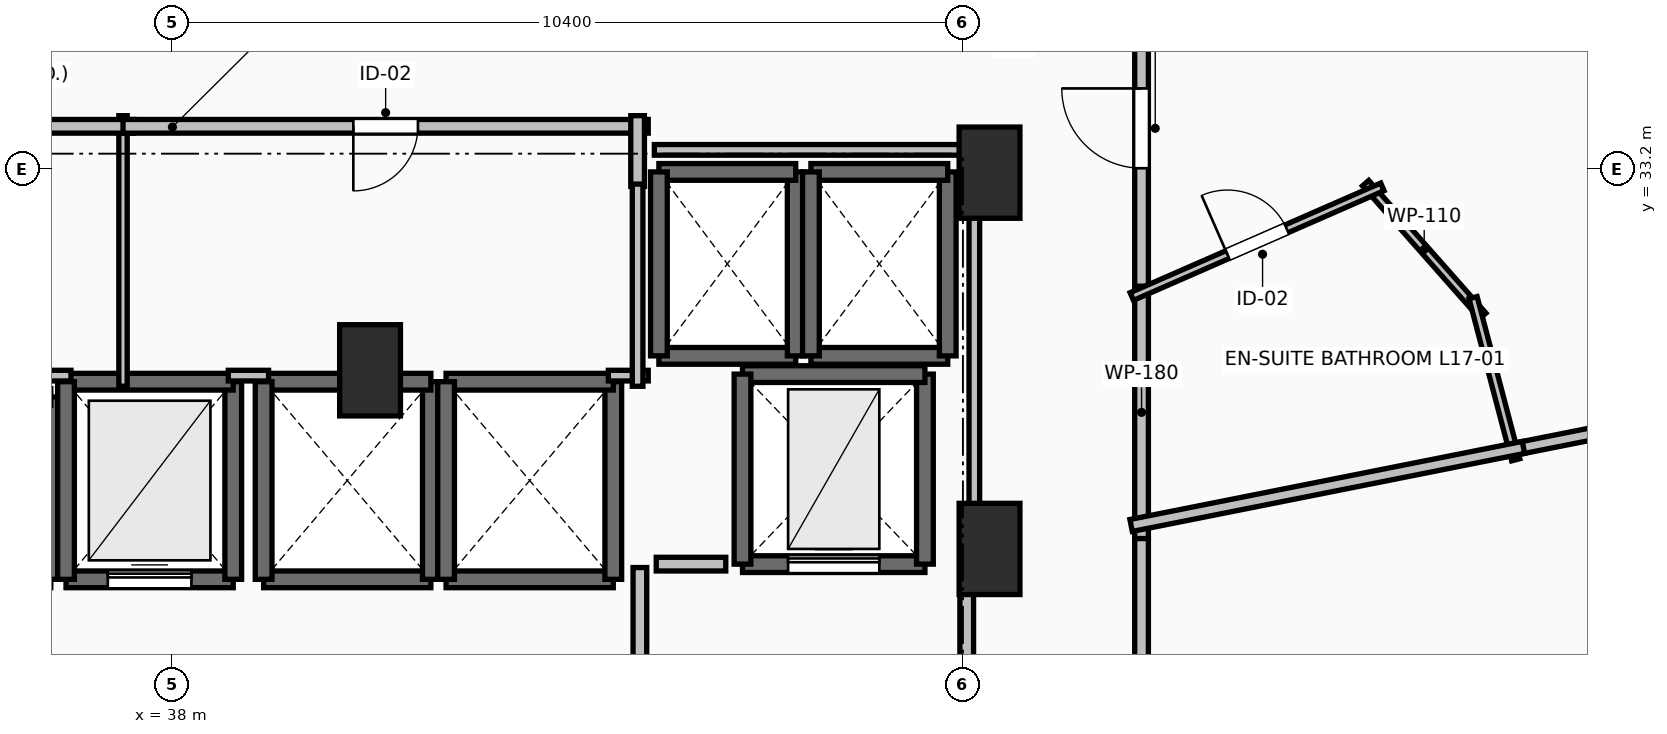
"""IFC4 building model, lengths in metres.
Left out: names, types, materials, properties, quantities, classifications, styles, units other than length and angle.
Written with IfcOpenShell. Run it as: python <this file> out.ifc"""

import sys

from ifc_helpers import new_model, si_unit, direction, frame, frame_2d, origin, origin_2d, place, context, subcontext, project, spatial, rectangle, extrude, element, fill, save


model = new_model("IFC4")
c1 = context("Model", 3, precision=1e-05, world=origin(), true_north=direction((0.0, 1.0)))
c2 = subcontext(c1, "Body", "Model", "MODEL_VIEW")
j1 = project(units=[si_unit("LENGTHUNIT", "METRE"), si_unit("PLANEANGLEUNIT", "RADIAN")], contexts=[c1])
p1 = place(None, origin())
s1 = spatial("IfcSite", under=j1, at=p1, CompositionType="ELEMENT")
p2 = place(p1, origin())
s2 = spatial("IfcBuilding", under=s1, at=p2, CompositionType="ELEMENT")
p3 = place(p2, frame((0.0, 0.0, 66.0)))
s3 = spatial("IfcBuildingStorey", under=s2, at=p3, CompositionType="ELEMENT", Elevation=66.0)
for number, where, z_axis, x_axis in (
    (1, (48.75, 33.15, 0.0), (0.0, 0.0, 1.0), (1.0, 0.0, 0.0)),
    (2, (48.75, 28.2, 0.0), (0.0, 0.0, 1.0), (1.0, 0.0, 0.0)),
    (3, (40.6, 30.55, 0.0), (0.0, 0.0, 1.0), (1.0, 0.0, 0.0)),
):
    element("IfcColumn", number, at=place(p3, frame(where, z_axis=z_axis, x_axis=x_axis)), inside=s3, PredefinedType="PILASTER", context=c2, shape_type="SweptSolid", body=[
        extrude(rectangle(XDim=0.8, YDim=1.2, at=origin_2d()), origin(), (0.0, 0.0, 1.0), 3.5),
    ])
p4 = place(p3, frame((36.4, 27.8, 0.0), z_axis=(0.0, 0.0, 1.0), x_axis=(0.0, 1.0, 0.0)))
e4 = element("IfcWall", 4, at=p4, inside=s3, PredefinedType="SOLIDWALL", context=c2, shape_type="SweptSolid", body=[
    extrude(rectangle(XDim=2.4, YDim=0.22, at=frame_2d((1.2, 0.0))), origin(), (0.0, 0.0, 1.0), 3.15),
])
p5 = place(p3, frame((36.6, 27.8, 0.0), z_axis=(0.0, 0.0, 1.0), x_axis=(1.0, 0.0, 0.0)))
e5 = element("IfcWall", 5, at=p5, inside=s3, PredefinedType="SOLIDWALL", context=c2, shape_type="SweptSolid", body=[
    extrude(rectangle(XDim=2.2, YDim=0.22, at=frame_2d((1.1, 0.0))), origin(), (0.0, 0.0, 1.0), 3.15),
])
p6 = place(p5, frame((0.55, 0.0, 0.0)))
e6 = element("IfcOpeningElement", 6, at=p6, cuts=e5, PredefinedType="OPENING", context=c2, shape_type="SweptSolid", body=[
    extrude(rectangle(XDim=1.1, YDim=2.2, at=frame_2d((0.55, 1.1))), frame((0.0, 0.125, 0.0), z_axis=(0.0, -1.0, 0.0), x_axis=(1.0, 0.0, 0.0)), (0.0, 0.0, 1.0), 0.25),
])
p7 = place(p3, frame((38.8, 27.8, 0.0), z_axis=(0.0, 0.0, 1.0), x_axis=(0.0, 1.0, 0.0)))
e7 = element("IfcWall", 7, at=p7, inside=s3, PredefinedType="SOLIDWALL", context=c2, shape_type="SweptSolid", body=[
    extrude(rectangle(XDim=2.6, YDim=0.22, at=frame_2d((1.3, 0.0))), origin(), (0.0, 0.0, 1.0), 3.15),
])
p8 = place(p3, frame((38.8, 30.4, 0.0), z_axis=(0.0, 0.0, 1.0), x_axis=(-1.0, 0.0, 0.0)))
e8 = element("IfcWall", 8, at=p8, inside=s3, PredefinedType="SOLIDWALL", context=c2, shape_type="SweptSolid", body=[
    extrude(rectangle(XDim=2.2, YDim=0.22, at=frame_2d((1.1, 0.0))), origin(), (0.0, 0.0, 1.0), 3.15),
])
p9 = place(p3, frame((36.6, 30.4, 0.0), z_axis=(0.0, 0.0, 1.0), x_axis=(0.0, -1.0, 0.0)))
e9 = element("IfcWall", 9, at=p9, inside=s3, PredefinedType="SOLIDWALL", context=c2, shape_type="SweptSolid", body=[
    extrude(rectangle(XDim=2.6, YDim=0.22, at=frame_2d((1.3, 0.0))), origin(), (0.0, 0.0, 1.0), 3.15),
])
p10 = place(p3, frame((39.2, 27.8, 0.0), z_axis=(0.0, 0.0, 1.0), x_axis=(1.0, 0.0, 0.0)))
e10 = element("IfcWall", 10, at=p10, inside=s3, PredefinedType="SOLIDWALL", context=c2, shape_type="SweptSolid", body=[
    extrude(rectangle(XDim=2.2, YDim=0.22, at=frame_2d((1.1, 0.0))), origin(), (0.0, 0.0, 1.0), 3.15),
])
p11 = place(p3, frame((41.4, 27.8, 0.0), z_axis=(0.0, 0.0, 1.0), x_axis=(0.0, 1.0, 0.0)))
e11 = element("IfcWall", 11, at=p11, inside=s3, PredefinedType="SOLIDWALL", context=c2, shape_type="SweptSolid", body=[
    extrude(rectangle(XDim=2.6, YDim=0.22, at=frame_2d((1.3, 0.0))), origin(), (0.0, 0.0, 1.0), 3.15),
])
p12 = place(p3, frame((41.4, 30.4, 0.0), z_axis=(0.0, 0.0, 1.0), x_axis=(-1.0, 0.0, 0.0)))
e12 = element("IfcWall", 12, at=p12, inside=s3, PredefinedType="SOLIDWALL", context=c2, shape_type="SweptSolid", body=[
    extrude(rectangle(XDim=2.2, YDim=0.22, at=frame_2d((1.1, 0.0))), origin(), (0.0, 0.0, 1.0), 3.15),
])
p13 = place(p3, frame((39.2, 30.4, 0.0), z_axis=(0.0, 0.0, 1.0), x_axis=(0.0, -1.0, 0.0)))
e13 = element("IfcWall", 13, at=p13, inside=s3, PredefinedType="SOLIDWALL", context=c2, shape_type="SweptSolid", body=[
    extrude(rectangle(XDim=2.6, YDim=0.22, at=frame_2d((1.3, 0.0))), origin(), (0.0, 0.0, 1.0), 3.15),
])
p14 = place(p3, frame((41.6, 27.8, 0.0), z_axis=(0.0, 0.0, 1.0), x_axis=(1.0, 0.0, 0.0)))
e14 = element("IfcWall", 14, at=p14, inside=s3, PredefinedType="SOLIDWALL", context=c2, shape_type="SweptSolid", body=[
    extrude(rectangle(XDim=2.2, YDim=0.22, at=frame_2d((1.1, 0.0))), origin(), (0.0, 0.0, 1.0), 3.15),
])
p15 = place(p3, frame((43.8, 27.8, 0.0), z_axis=(0.0, 0.0, 1.0), x_axis=(0.0, 1.0, 0.0)))
e15 = element("IfcWall", 15, at=p15, inside=s3, PredefinedType="SOLIDWALL", context=c2, shape_type="SweptSolid", body=[
    extrude(rectangle(XDim=2.6, YDim=0.22, at=frame_2d((1.3, 0.0))), origin(), (0.0, 0.0, 1.0), 3.15),
])
p16 = place(p3, frame((43.8, 30.4, 0.0), z_axis=(0.0, 0.0, 1.0), x_axis=(-1.0, 0.0, 0.0)))
e16 = element("IfcWall", 16, at=p16, inside=s3, PredefinedType="SOLIDWALL", context=c2, shape_type="SweptSolid", body=[
    extrude(rectangle(XDim=2.2, YDim=0.22, at=frame_2d((1.1, 0.0))), origin(), (0.0, 0.0, 1.0), 3.15),
])
p17 = place(p3, frame((41.6, 30.4, 0.0), z_axis=(0.0, 0.0, 1.0), x_axis=(0.0, -1.0, 0.0)))
e17 = element("IfcWall", 17, at=p17, inside=s3, PredefinedType="SOLIDWALL", context=c2, shape_type="SweptSolid", body=[
    extrude(rectangle(XDim=2.6, YDim=0.22, at=frame_2d((1.3, 0.0))), origin(), (0.0, 0.0, 1.0), 3.15),
])
p18 = place(p3, frame((44.4, 30.74, 0.0), z_axis=(0.0, 0.0, 1.0), x_axis=(1.0, 0.0, 0.0)))
e18 = element("IfcWall", 18, at=p18, inside=s3, PredefinedType="SOLIDWALL", context=c2, shape_type="SweptSolid", body=[
    extrude(rectangle(XDim=1.8, YDim=0.22, at=frame_2d((0.9, 0.0))), origin(), (0.0, 0.0, 1.0), 3.15),
])
p19 = place(p3, frame((46.2, 30.74, 0.0), z_axis=(0.0, 0.0, 1.0), x_axis=(0.0, 1.0, 0.0)))
e19 = element("IfcWall", 19, at=p19, inside=s3, PredefinedType="SOLIDWALL", context=c2, shape_type="SweptSolid", body=[
    extrude(rectangle(XDim=2.42, YDim=0.22, at=frame_2d((1.21, 0.0))), origin(), (0.0, 0.0, 1.0), 3.15),
])
p20 = place(p3, frame((46.2, 33.16, 0.0), z_axis=(0.0, 0.0, 1.0), x_axis=(-1.0, 0.0, 0.0)))
e20 = element("IfcWall", 20, at=p20, inside=s3, PredefinedType="SOLIDWALL", context=c2, shape_type="SweptSolid", body=[
    extrude(rectangle(XDim=1.8, YDim=0.22, at=frame_2d((0.9, 0.0))), origin(), (0.0, 0.0, 1.0), 3.15),
])
p21 = place(p3, frame((44.4, 33.16, 0.0), z_axis=(0.0, 0.0, 1.0), x_axis=(0.0, -1.0, 0.0)))
e21 = element("IfcWall", 21, at=p21, inside=s3, PredefinedType="SOLIDWALL", context=c2, shape_type="SweptSolid", body=[
    extrude(rectangle(XDim=2.42, YDim=0.22, at=frame_2d((1.21, 0.0))), origin(), (0.0, 0.0, 1.0), 3.15),
])
p22 = place(p3, frame((46.4, 30.74, 0.0), z_axis=(0.0, 0.0, 1.0), x_axis=(1.0, 0.0, 0.0)))
e22 = element("IfcWall", 22, at=p22, inside=s3, PredefinedType="SOLIDWALL", context=c2, shape_type="SweptSolid", body=[
    extrude(rectangle(XDim=1.8, YDim=0.22, at=frame_2d((0.9, 0.0))), origin(), (0.0, 0.0, 1.0), 3.15),
])
p23 = place(p3, frame((48.2, 30.74, 0.0), z_axis=(0.0, 0.0, 1.0), x_axis=(0.0, 1.0, 0.0)))
e23 = element("IfcWall", 23, at=p23, inside=s3, PredefinedType="SOLIDWALL", context=c2, shape_type="SweptSolid", body=[
    extrude(rectangle(XDim=2.42, YDim=0.22, at=frame_2d((1.21, 0.0))), origin(), (0.0, 0.0, 1.0), 3.15),
])
p24 = place(p3, frame((48.2, 33.16, 0.0), z_axis=(0.0, 0.0, 1.0), x_axis=(-1.0, 0.0, 0.0)))
e24 = element("IfcWall", 24, at=p24, inside=s3, PredefinedType="SOLIDWALL", context=c2, shape_type="SweptSolid", body=[
    extrude(rectangle(XDim=1.8, YDim=0.22, at=frame_2d((0.9, 0.0))), origin(), (0.0, 0.0, 1.0), 3.15),
])
p25 = place(p3, frame((46.4, 33.16, 0.0), z_axis=(0.0, 0.0, 1.0), x_axis=(0.0, -1.0, 0.0)))
e25 = element("IfcWall", 25, at=p25, inside=s3, PredefinedType="SOLIDWALL", context=c2, shape_type="SweptSolid", body=[
    extrude(rectangle(XDim=2.42, YDim=0.22, at=frame_2d((1.21, 0.0))), origin(), (0.0, 0.0, 1.0), 3.15),
])
p26 = place(p3, frame((45.5, 28.0, 0.0), z_axis=(0.0, 0.0, 1.0), x_axis=(1.0, 0.0, 0.0)))
e26 = element("IfcWall", 26, at=p26, inside=s3, PredefinedType="SHEAR", context=c2, shape_type="SweptSolid", body=[
    extrude(rectangle(XDim=2.4, YDim=0.22, at=frame_2d((1.2, 0.0))), origin(), (0.0, 0.0, 1.0), 3.15),
])
p27 = place(p26, frame((0.6, 0.0, 0.0)))
e27 = element("IfcOpeningElement", 27, at=p27, cuts=e26, PredefinedType="OPENING", context=c2, shape_type="SweptSolid", body=[
    extrude(rectangle(XDim=1.2, YDim=2.2, at=frame_2d((0.6, 1.1))), frame((0.0, 0.125, 0.0), z_axis=(0.0, -1.0, 0.0), x_axis=(1.0, 0.0, 0.0)), (0.0, 0.0, 1.0), 0.25),
])
p28 = place(p3, frame((47.9, 28.0, 0.0), z_axis=(0.0, 0.0, 1.0), x_axis=(0.0, 1.0, 0.0)))
e28 = element("IfcWall", 28, at=p28, inside=s3, PredefinedType="SHEAR", context=c2, shape_type="SweptSolid", body=[
    extrude(rectangle(XDim=2.5, YDim=0.22, at=frame_2d((1.25, 0.0))), origin(), (0.0, 0.0, 1.0), 3.15),
])
p29 = place(p3, frame((47.9, 30.5, 0.0), z_axis=(0.0, 0.0, 1.0), x_axis=(-1.0, 0.0, 0.0)))
e29 = element("IfcWall", 29, at=p29, inside=s3, PredefinedType="SHEAR", context=c2, shape_type="SweptSolid", body=[
    extrude(rectangle(XDim=2.4, YDim=0.22, at=frame_2d((1.2, 0.0))), origin(), (0.0, 0.0, 1.0), 3.15),
])
p30 = place(p3, frame((45.5, 30.5, 0.0), z_axis=(0.0, 0.0, 1.0), x_axis=(0.0, -1.0, 0.0)))
e30 = element("IfcWall", 30, at=p30, inside=s3, PredefinedType="SHEAR", context=c2, shape_type="SweptSolid", body=[
    extrude(rectangle(XDim=2.5, YDim=0.22, at=frame_2d((1.25, 0.0))), origin(), (0.0, 0.0, 1.0), 3.15),
])
p31 = place(p3, frame((44.15, 27.955, 0.0), z_axis=(0.0, 0.0, 1.0), x_axis=(0.0, -1.0, 0.0)))
e31 = element("IfcWall", 31, at=p31, inside=s3, PredefinedType="PARTITIONING", context=c2, shape_type="SweptSolid", body=[
    extrude(rectangle(XDim=3.91, YDim=0.18, at=frame_2d((1.955, 0.0))), origin(), (0.0, 0.0, 1.0), 3.15),
])
p32 = place(p31, frame((1.355, 0.0, 0.0)))
e32 = element("IfcOpeningElement", 32, at=p32, cuts=e31, PredefinedType="OPENING", context=c2, shape_type="SweptSolid", body=[
    extrude(rectangle(XDim=1.2, YDim=2.15, at=frame_2d((0.6, 1.075))), frame((0.0, 0.105, 0.0), z_axis=(0.0, -1.0, 0.0), x_axis=(1.0, 0.0, 0.0)), (0.0, 0.0, 1.0), 0.21),
])
p33 = place(p3, frame((48.45, 23.95, 0.0), z_axis=(0.0, 0.0, 1.0), x_axis=(0.0, 1.0, 0.0)))
e33 = element("IfcWall", 33, at=p33, inside=s3, PredefinedType="PARTITIONING", context=c2, shape_type="SweptSolid", body=[
    extrude(rectangle(XDim=4.05, YDim=0.18, at=frame_2d((2.025, 0.0))), origin(), (0.0, 0.0, 1.0), 3.15),
])
p34 = place(p33, frame((1.425, 0.0, 0.0)))
e34 = element("IfcOpeningElement", 34, at=p34, cuts=e33, PredefinedType="OPENING", context=c2, shape_type="SweptSolid", body=[
    extrude(rectangle(XDim=1.2, YDim=2.15, at=frame_2d((0.6, 1.075))), frame((0.0, 0.105, 0.0), z_axis=(0.0, -1.0, 0.0), x_axis=(1.0, 0.0, 0.0)), (0.0, 0.0, 1.0), 0.21),
])
p35 = place(p3, frame((37.35, 30.34, 0.0), z_axis=(0.0, 0.0, 1.0), x_axis=(0.0, 1.0, 0.0)))
e35 = element("IfcWall", 35, at=p35, inside=s3, PredefinedType="PARTITIONING", context=c2, shape_type="SweptSolid", body=[
    extrude(rectangle(XDim=3.56, YDim=0.11, at=frame_2d((1.78, 0.0))), origin(), (0.0, 0.0, 1.0), 2.342),
])
p36 = place(p3, frame((37.49, 33.76, 0.0), z_axis=(0.0, 0.0, 1.0), x_axis=(-1.0, 0.0, 0.0)))
e36 = element("IfcWall", 36, at=p36, inside=s3, PredefinedType="PARTITIONING", context=c2, shape_type="SweptSolid", body=[
    extrude(rectangle(XDim=4.13, YDim=0.18, at=frame_2d((2.065, 0.0))), origin(), (0.0, 0.0, 1.0), 3.15),
])
p37 = place(p36, frame((1.64, 0.0, 0.0)))
e37 = element("IfcOpeningElement", 37, at=p37, cuts=e36, PredefinedType="OPENING", context=c2, shape_type="SweptSolid", body=[
    extrude(rectangle(XDim=0.85, YDim=2.1, at=frame_2d((0.425, 1.05))), frame((0.0, 0.105, 0.0), z_axis=(0.0, -1.0, 0.0), x_axis=(1.0, 0.0, 0.0)), (0.0, 0.0, 1.0), 0.21),
])
p38 = place(p3, frame((44.26, 33.76, 0.0), z_axis=(0.0, 0.0, 1.0), x_axis=(-1.0, 0.0, 0.0)))
e38 = element("IfcWall", 38, at=p38, inside=s3, PredefinedType="PARTITIONING", context=c2, shape_type="SweptSolid", body=[
    extrude(rectangle(XDim=6.91, YDim=0.18, at=frame_2d((3.455, 0.0))), origin(), (0.0, 0.0, 1.0), 3.15),
])
p39 = place(p38, frame((3.03, 0.0, 0.0)))
e39 = element("IfcOpeningElement", 39, at=p39, cuts=e38, PredefinedType="OPENING", context=c2, shape_type="SweptSolid", body=[
    extrude(rectangle(XDim=0.85, YDim=2.1, at=frame_2d((0.425, 1.05))), frame((0.0, 0.105, 0.0), z_axis=(0.0, -1.0, 0.0), x_axis=(1.0, 0.0, 0.0)), (0.0, 0.0, 1.0), 0.21),
])
p40 = place(p3, frame((44.12, 32.97, 0.0), z_axis=(0.0, 0.0, 1.0), x_axis=(0.0, 1.0, 0.0)))
e40 = element("IfcWall", 40, at=p40, inside=s3, PredefinedType="PARTITIONING", context=c2, shape_type="SweptSolid", body=[
    extrude(rectangle(XDim=0.93, YDim=0.18, at=frame_2d((0.465, 0.0))), origin(), (0.0, 0.0, 1.0), 3.15),
])
p41 = place(p3, frame((50.75, 31.517, 0.0), z_axis=(0.0, 0.0, 1.0), x_axis=(0.0, 1.0, 0.0)))
e41 = element("IfcWall", 41, at=p41, inside=s3, PredefinedType="PARTITIONING", context=c2, shape_type="SweptSolid", body=[
    extrude(rectangle(XDim=4.433, YDim=0.18, at=frame_2d((2.216, 0.0))), origin(), (0.0, 0.0, 1.0), 2.342),
])
p42 = place(p41, frame((1.691, 0.0, 0.0)))
e42 = element("IfcOpeningElement", 42, at=p42, cuts=e41, PredefinedType="OPENING", context=c2, shape_type="SweptSolid", body=[
    extrude(rectangle(XDim=1.05, YDim=2.2, at=frame_2d((0.525, 1.1))), frame((0.0, 0.105, 0.0), z_axis=(0.0, -1.0, 0.0), x_axis=(1.0, 0.0, 0.0)), (0.0, 0.0, 1.0), 0.21),
])
p43 = place(p3, frame((50.75, 28.336, 0.0), z_axis=(0.0, 0.0, 1.0), x_axis=(0.0, 1.0, 0.0)))
e43 = element("IfcWall", 43, at=p43, inside=s3, PredefinedType="PARTITIONING", context=c2, shape_type="SweptSolid", body=[
    extrude(rectangle(XDim=3.321, YDim=0.18, at=frame_2d((1.661, 0.0))), origin(), (0.0, 0.0, 1.0), 3.15),
])
p44 = place(p3, frame((50.75, 17.541, 0.0), z_axis=(0.0, 0.0, 1.0), x_axis=(0.0, 1.0, 0.0)))
e44 = element("IfcWall", 44, at=p44, inside=s3, PredefinedType="PARTITIONING", context=c2, shape_type="SweptSolid", body=[
    extrude(rectangle(XDim=10.795, YDim=0.18, at=frame_2d((5.397, 0.0))), origin(), (0.0, 0.0, 1.0), 2.342),
])
p45 = place(p44, frame((4.897, 0.0, 0.0)))
e45 = element("IfcOpeningElement", 45, at=p45, cuts=e44, PredefinedType="OPENING", context=c2, shape_type="SweptSolid", body=[
    extrude(rectangle(XDim=1.0, YDim=2.15, at=frame_2d((0.5, 1.075))), frame((0.0, 0.105, 0.0), z_axis=(0.0, -1.0, 0.0), x_axis=(1.0, 0.0, 0.0)), (0.0, 0.0, 1.0), 0.21),
])
p46 = place(p3, frame((53.697, 33.012, 0.0), z_axis=(0.0, 0.0, 1.0), x_axis=(0.66211021146, -0.749406477074, 0.0)))
e46 = element("IfcWall", 46, at=p46, inside=s3, PredefinedType="PARTITIONING", context=c2, shape_type="SweptSolid", body=[
    extrude(rectangle(XDim=2.33, YDim=0.11, at=frame_2d((1.165, 0.0))), origin(), (0.0, 0.0, 1.0), 2.342),
])
p47 = place(p3, frame((55.111, 31.506, 0.0), z_axis=(0.0, 0.0, 1.0), x_axis=(0.254389812051, -0.967101764823, 0.0)))
e47 = element("IfcWall", 47, at=p47, inside=s3, PredefinedType="PARTITIONING", context=c2, shape_type="SweptSolid", body=[
    extrude(rectangle(XDim=2.206, YDim=0.11, at=frame_2d((1.103, 0.0))), origin(), (0.0, 0.0, 1.0), 3.15),
])
p48 = place(p3, frame((50.622, 31.521, 0.0), z_axis=(0.0, 0.0, 1.0), x_axis=(0.91617134915, 0.400786799928, 0.0)))
e48 = element("IfcWall", 48, at=p48, inside=s3, PredefinedType="PARTITIONING", context=c2, shape_type="SweptSolid", body=[
    extrude(rectangle(XDim=3.598, YDim=0.11, at=frame_2d((1.799, 0.0))), origin(), (0.0, 0.0, 1.0), 2.342),
])
p49 = place(p48, frame((1.374, 0.0, 0.0)))
e49 = element("IfcOpeningElement", 49, at=p49, cuts=e48, PredefinedType="OPENING", context=c2, shape_type="SweptSolid", body=[
    extrude(rectangle(XDim=0.85, YDim=2.1, at=frame_2d((0.425, 1.05))), frame((0.0, 0.07, 0.0), z_axis=(0.0, -1.0, 0.0), x_axis=(1.0, 0.0, 0.0)), (0.0, 0.0, 1.0), 0.14),
])
p50 = place(p3, frame((55.637, 29.508, 0.0), z_axis=(0.0, 0.0, 1.0), x_axis=(0.980781844691, 0.195107593712, 0.0)))
e50 = element("IfcWall", 50, at=p50, inside=s3, PredefinedType="PARTITIONING", context=c2, shape_type="SweptSolid", body=[
    extrude(rectangle(XDim=11.034, YDim=0.16, at=frame_2d((5.517, 0.0))), origin(), (0.0, 0.0, 1.0), 2.534),
])
p51 = place(p3, frame((50.613, 28.509, 0.0), z_axis=(0.0, 0.0, 1.0), x_axis=(0.980788877604, 0.195072236795, 0.0)))
e51 = element("IfcWall", 51, at=p51, inside=s3, PredefinedType="PARTITIONING", context=c2, shape_type="SweptSolid", body=[
    extrude(rectangle(XDim=5.263, YDim=0.16, at=frame_2d((2.631, 0.0))), origin(), (0.0, 0.0, 1.0), 2.784),
])
p52 = place(p3, frame((45.28, 28.0, 0.0), z_axis=(0.0, 0.0, 1.0), x_axis=(-1.0, 0.0, 0.0)))
e52 = element("IfcWall", 52, at=p52, inside=s3, PredefinedType="PARTITIONING", context=c2, shape_type="SweptSolid", body=[
    extrude(rectangle(XDim=0.915, YDim=0.18, at=frame_2d((0.458, 0.0))), origin(), (0.0, 0.0, 1.0), 3.15),
])
p53 = place(p3, frame((33.44, 30.48, 0.0), z_axis=(0.0, 0.0, 1.0), x_axis=(1.0, 0.0, 0.0)))
e53 = element("IfcWall", 53, at=p53, inside=s3, PredefinedType="PARTITIONING", context=c2, shape_type="SweptSolid", body=[
    extrude(rectangle(XDim=3.225, YDim=0.14, at=frame_2d((1.613, 0.0))), origin(), (0.0, 0.0, 1.0), 2.342),
])
p54 = place(p3, frame((38.735, 30.48, 0.0), z_axis=(0.0, 0.0, 1.0), x_axis=(1.0, 0.0, 0.0)))
e54 = element("IfcWall", 54, at=p54, inside=s3, PredefinedType="PARTITIONING", context=c2, shape_type="SweptSolid", body=[
    extrude(rectangle(XDim=0.53, YDim=0.14, at=frame_2d((0.265, 0.0))), origin(), (0.0, 0.0, 1.0), 2.342),
])
p55 = place(p3, frame((43.735, 30.48, 0.0), z_axis=(0.0, 0.0, 1.0), x_axis=(1.0, 0.0, 0.0)))
e55 = element("IfcWall", 55, at=p55, inside=s3, PredefinedType="PARTITIONING", context=c2, shape_type="SweptSolid", body=[
    extrude(rectangle(XDim=0.525, YDim=0.14, at=frame_2d((0.262, 0.0))), origin(), (0.0, 0.0, 1.0), 3.15),
])
p56 = place(p3, frame((44.12, 30.34, 0.0), z_axis=(0.0, 0.0, 1.0), x_axis=(0.0, 1.0, 0.0)))
e56 = element("IfcWall", 56, at=p56, inside=s3, PredefinedType="PARTITIONING", context=c2, shape_type="SweptSolid", body=[
    extrude(rectangle(XDim=2.66, YDim=0.14, at=frame_2d((1.33, 0.0))), origin(), (0.0, 0.0, 1.0), 3.15),
])
p57 = place(p3, frame((44.34, 33.45, 0.0), z_axis=(0.0, 0.0, 1.0), x_axis=(1.0, 0.0, 0.0)))
e57 = element("IfcWall", 57, at=p57, inside=s3, PredefinedType="PARTITIONING", context=c2, shape_type="SweptSolid", body=[
    extrude(rectangle(XDim=4.21, YDim=0.14, at=frame_2d((2.105, 0.0))), origin(), (0.0, 0.0, 1.0), 2.342),
])
p58 = place(p3, frame((48.55, 33.45, 0.0), z_axis=(0.0, 0.0, 1.0), x_axis=(0.0, -1.0, 0.0)))
e58 = element("IfcWall", 58, at=p58, inside=s3, PredefinedType="PARTITIONING", context=c2, shape_type="SweptSolid", body=[
    extrude(rectangle(XDim=5.254, YDim=0.14, at=frame_2d((2.627, 0.0))), origin(), (0.0, 0.0, 1.0), 2.342),
])
p59 = place(p6, origin())
e59 = element("IfcDoor", 59, at=p59, inside=s3, OperationType="SLIDING_TO_LEFT", PredefinedType="DOOR", context=c2, shape_type="SweptSolid", body=[
    extrude(rectangle(XDim=1.1, YDim=2.2, at=frame_2d((0.55, 1.1))), frame((0.0, 0.025, 0.0), z_axis=(0.0, -1.0, 0.0), x_axis=(1.0, 0.0, 0.0)), (0.0, 0.0, 1.0), 0.05),
])
fill(e6, e59)
p60 = place(p27, origin())
e60 = element("IfcDoor", 60, at=p60, inside=s3, OperationType="SLIDING_TO_LEFT", PredefinedType="DOOR", context=c2, shape_type="SweptSolid", body=[
    extrude(rectangle(XDim=1.2, YDim=2.2, at=frame_2d((0.6, 1.1))), frame((0.0, 0.025, 0.0), z_axis=(0.0, -1.0, 0.0), x_axis=(1.0, 0.0, 0.0)), (0.0, 0.0, 1.0), 0.05),
])
fill(e27, e60)
p61 = place(p39, origin())
e61 = element("IfcDoor", 61, at=p61, inside=s3, OperationType="SINGLE_SWING_RIGHT", PredefinedType="DOOR", context=c2, shape_type="SweptSolid", body=[
    extrude(rectangle(XDim=0.85, YDim=2.1, at=frame_2d((0.425, 1.05))), frame((0.0, 0.025, 0.0), z_axis=(0.0, -1.0, 0.0), x_axis=(1.0, 0.0, 0.0)), (0.0, 0.0, 1.0), 0.05),
])
fill(e39, e61)
p62 = place(p42, origin())
e62 = element("IfcDoor", 62, at=p62, inside=s3, OperationType="SINGLE_SWING_RIGHT", PredefinedType="DOOR", context=c2, shape_type="SweptSolid", body=[
    extrude(rectangle(XDim=1.05, YDim=2.2, at=frame_2d((0.525, 1.1))), frame((0.0, 0.025, 0.0), z_axis=(0.0, -1.0, 0.0), x_axis=(1.0, 0.0, 0.0)), (0.0, 0.0, 1.0), 0.05),
])
fill(e42, e62)
p63 = place(p49, origin())
e63 = element("IfcDoor", 63, at=p63, inside=s3, OperationType="SINGLE_SWING_LEFT", PredefinedType="DOOR", context=c2, shape_type="SweptSolid", body=[
    extrude(rectangle(XDim=0.85, YDim=2.1, at=frame_2d((0.425, 1.05))), frame((0.0, 0.025, 0.0), z_axis=(0.0, -1.0, 0.0), x_axis=(1.0, 0.0, 0.0)), (0.0, 0.0, 1.0), 0.05),
])
fill(e49, e63)
save(model, sys.argv[1])
